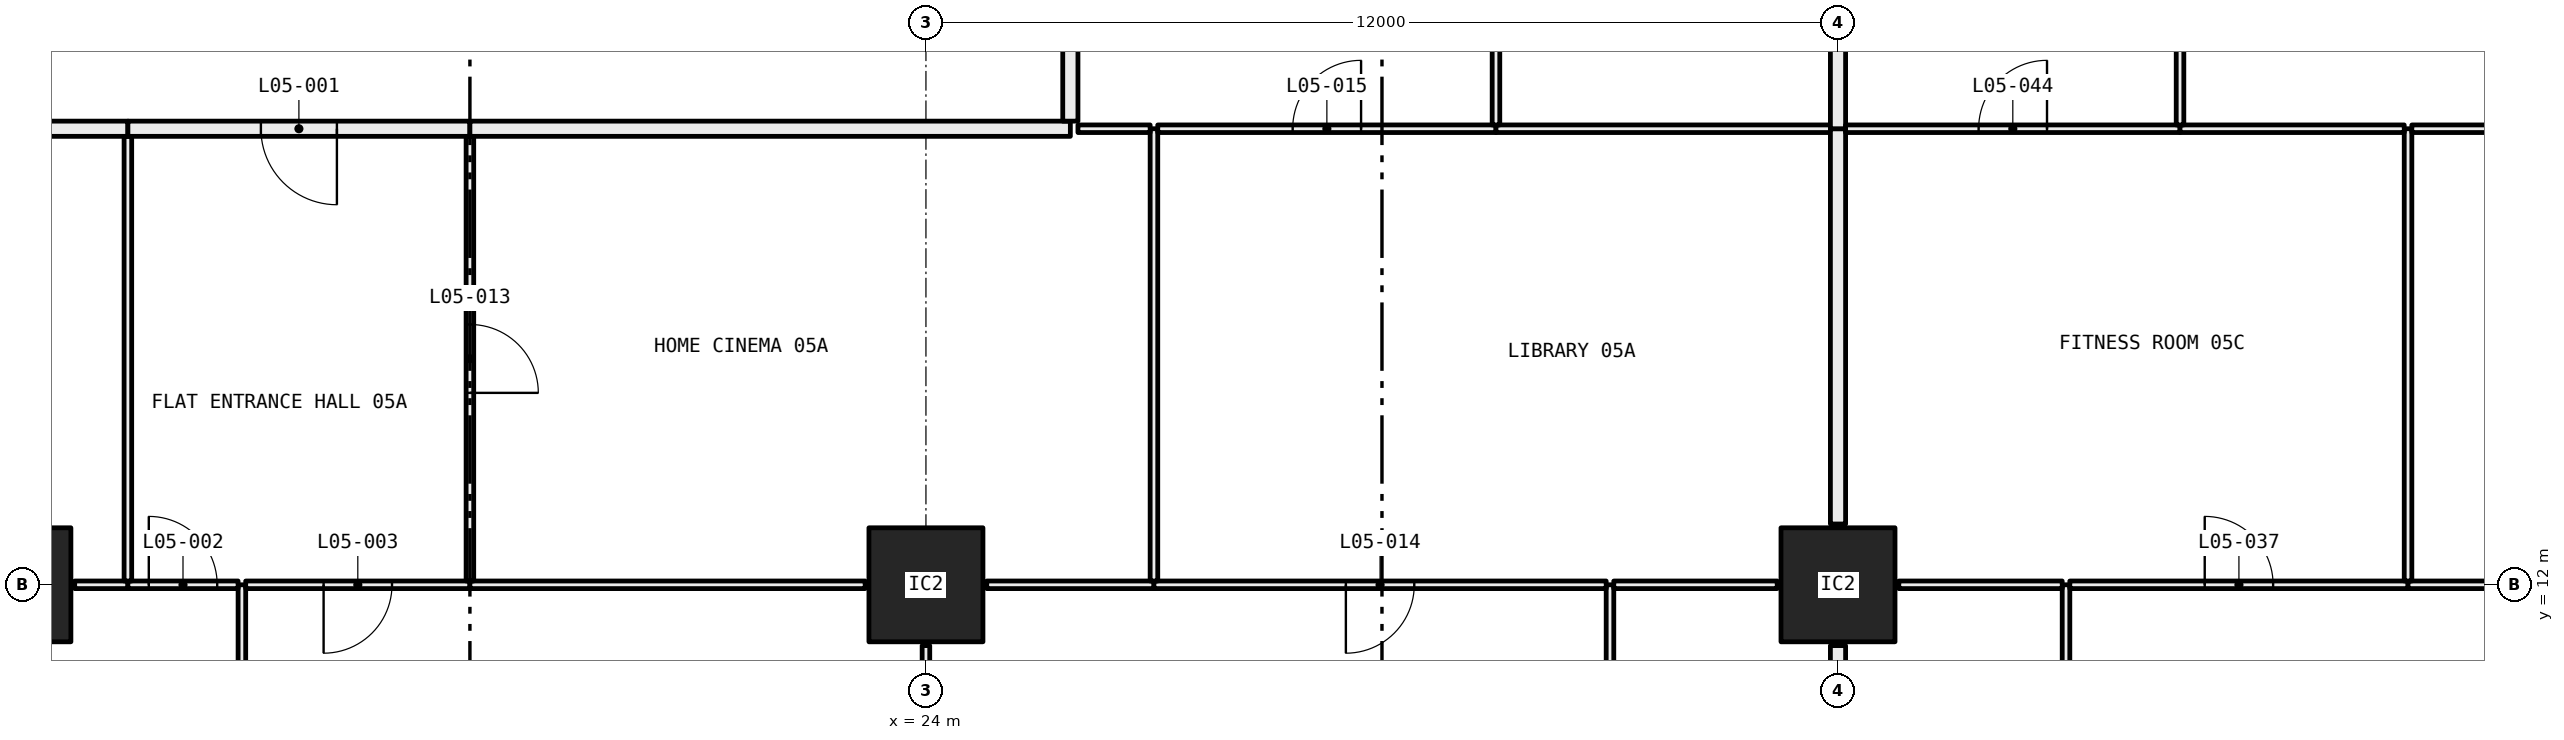
"""IFC4 building model, lengths in metres.
Left out: names, types, materials, properties, quantities, classifications, styles, units other than length and angle.
Written with IfcOpenShell. Run it as: python <this file> out.ifc"""

import sys

from ifc_helpers import new_model, si_unit, direction, frame, frame_2d, origin, origin_2d, place, context, subcontext, project, spatial, rectangle, hollow_rectangle, extrude, element, fill, save


model = new_model("IFC4")
c1 = context("Model", 3, precision=1e-05, world=origin(), true_north=direction((0.0, 1.0)))
c2 = subcontext(c1, "Body", "Model", "MODEL_VIEW")
j1 = project(units=[si_unit("LENGTHUNIT", "METRE"), si_unit("PLANEANGLEUNIT", "RADIAN")], contexts=[c1])
p1 = place(None, origin())
s1 = spatial("IfcSite", under=j1, at=p1, CompositionType="ELEMENT")
p2 = place(p1, origin())
s2 = spatial("IfcBuilding", under=s1, at=p2, CompositionType="ELEMENT")
p3 = place(p2, frame((0.0, 0.0, 30.0)))
s3 = spatial("IfcBuildingStorey", under=s2, at=p3, CompositionType="ELEMENT", Elevation=30.0)
for number, where, z_axis, x_axis in (
    (1, (12.0, 12.0, 0.0), (0.0, 0.0, 1.0), (1.0, 0.0, 0.0)),
    (2, (24.0, 12.0, 0.0), (0.0, 0.0, 1.0), (1.0, 0.0, 0.0)),
    (3, (36.0, 12.0, 0.0), (0.0, 0.0, 1.0), (1.0, 0.0, 0.0)),
):
    element("IfcColumn", number, at=place(p3, frame(where, z_axis=z_axis, x_axis=x_axis)), inside=s3, PredefinedType="COLUMN", context=c2, shape_type="SweptSolid", body=[
        extrude(hollow_rectangle(XDim=1.5, YDim=1.5, WallThickness=0.065, at=origin_2d()), origin(), (0.0, 0.0, 1.0), 3.05),
    ])
p4 = place(p3, frame((15.0, 6.05, 0.0), z_axis=(0.0, 0.0, 1.0), x_axis=(0.0, 1.0, 0.0)))
e4 = element("IfcWall", 4, at=p4, inside=s3, PredefinedType="PARTITIONING", context=c2, shape_type="SweptSolid", body=[
    extrude(rectangle(XDim=5.95, YDim=0.1, at=frame_2d((2.975, 0.0))), origin(), (0.0, 0.0, 1.0), 2.45),
])
p5 = place(p3, frame((13.5, 12.0, 0.0), z_axis=(0.0, 0.0, 1.0), x_axis=(-1.0, 0.0, 0.0)))
e5 = element("IfcWall", 5, at=p5, inside=s3, PredefinedType="PARTITIONING", context=c2, shape_type="SweptSolid", body=[
    extrude(rectangle(XDim=0.7, YDim=0.1, at=frame_2d((0.35, 0.0))), origin(), (0.0, 0.0, 1.0), 2.45),
])
p6 = place(p3, frame((14.95, 12.0, 0.0), z_axis=(0.0, 0.0, 1.0), x_axis=(-1.0, 0.0, 0.0)))
e6 = element("IfcWall", 6, at=p6, inside=s3, PredefinedType="PARTITIONING", context=c2, shape_type="SweptSolid", body=[
    extrude(rectangle(XDim=1.45, YDim=0.1, at=frame_2d((0.725, 0.0))), origin(), (0.0, 0.0, 1.0), 2.45),
])
p7 = place(p6, frame((0.275, 0.0, 0.0)))
e7 = element("IfcOpeningElement", 7, at=p7, cuts=e6, PredefinedType="OPENING", context=c2, shape_type="SweptSolid", body=[
    extrude(rectangle(XDim=0.9, YDim=2.1, at=frame_2d((0.45, 1.05))), frame((0.0, 0.06, 0.0), z_axis=(0.0, -1.0, 0.0), x_axis=(1.0, 0.0, 0.0)), (0.0, 0.0, 1.0), 0.12),
])
p8 = place(p3, frame((24.0, 6.05, 0.0), z_axis=(0.0, 0.0, 1.0), x_axis=(0.0, 1.0, 0.0)))
e8 = element("IfcWall", 8, at=p8, inside=s3, PredefinedType="PARTITIONING", context=c2, shape_type="SweptSolid", body=[
    extrude(rectangle(XDim=5.15, YDim=0.1, at=frame_2d((2.575, 0.0))), origin(), (0.0, 0.0, 1.0), 2.45),
])
p9 = place(p8, frame((2.125, 0.0, 0.0)))
e9 = element("IfcOpeningElement", 9, at=p9, cuts=e8, PredefinedType="OPENING", context=c2, shape_type="SweptSolid", body=[
    extrude(rectangle(XDim=0.9, YDim=2.1, at=frame_2d((0.45, 1.05))), frame((0.0, 0.06, 0.0), z_axis=(0.0, -1.0, 0.0), x_axis=(1.0, 0.0, 0.0)), (0.0, 0.0, 1.0), 0.12),
])
p10 = place(p3, frame((18.0, 12.0, 0.0), z_axis=(0.0, 0.0, 1.0), x_axis=(-1.0, 0.0, 0.0)))
e10 = element("IfcWall", 10, at=p10, inside=s3, PredefinedType="PARTITIONING", context=c2, shape_type="SweptSolid", body=[
    extrude(rectangle(XDim=2.95, YDim=0.1, at=frame_2d((1.475, 0.0))), origin(), (0.0, 0.0, 1.0), 2.45),
])
p11 = place(p10, frame((1.025, 0.0, 0.0)))
e11 = element("IfcOpeningElement", 11, at=p11, cuts=e10, PredefinedType="OPENING", context=c2, shape_type="SweptSolid", body=[
    extrude(rectangle(XDim=0.9, YDim=2.1, at=frame_2d((0.45, 1.05))), frame((0.0, 0.06, 0.0), z_axis=(0.0, -1.0, 0.0), x_axis=(1.0, 0.0, 0.0)), (0.0, 0.0, 1.0), 0.12),
])
p12 = place(p3, frame((23.2, 12.0, 0.0), z_axis=(0.0, 0.0, 1.0), x_axis=(-1.0, 0.0, 0.0)))
e12 = element("IfcWall", 12, at=p12, inside=s3, PredefinedType="PARTITIONING", context=c2, shape_type="SweptSolid", body=[
    extrude(rectangle(XDim=5.2, YDim=0.1, at=frame_2d((2.6, 0.0))), origin(), (0.0, 0.0, 1.0), 2.45),
])
p13 = place(p3, frame((33.0, 6.05, 0.0), z_axis=(0.0, 0.0, 1.0), x_axis=(0.0, 1.0, 0.0)))
e13 = element("IfcWall", 13, at=p13, inside=s3, PredefinedType="PARTITIONING", context=c2, shape_type="SweptSolid", body=[
    extrude(rectangle(XDim=5.95, YDim=0.1, at=frame_2d((2.975, 0.0))), origin(), (0.0, 0.0, 1.0), 2.45),
])
p14 = place(p13, frame((2.525, 0.0, 0.0)))
e14 = element("IfcOpeningElement", 14, at=p14, cuts=e13, PredefinedType="OPENING", context=c2, shape_type="SweptSolid", body=[
    extrude(rectangle(XDim=0.9, YDim=2.1, at=frame_2d((0.45, 1.05))), frame((0.0, 0.06, 0.0), z_axis=(0.0, -1.0, 0.0), x_axis=(1.0, 0.0, 0.0)), (0.0, 0.0, 1.0), 0.12),
])
p15 = place(p3, frame((27.0, 12.0, 0.0), z_axis=(0.0, 0.0, 1.0), x_axis=(-1.0, 0.0, 0.0)))
e15 = element("IfcWall", 15, at=p15, inside=s3, PredefinedType="PARTITIONING", context=c2, shape_type="SweptSolid", body=[
    extrude(rectangle(XDim=2.2, YDim=0.1, at=frame_2d((1.1, 0.0))), origin(), (0.0, 0.0, 1.0), 2.45),
])
p16 = place(p3, frame((32.95, 12.0, 0.0), z_axis=(0.0, 0.0, 1.0), x_axis=(-1.0, 0.0, 0.0)))
e16 = element("IfcWall", 16, at=p16, inside=s3, PredefinedType="PARTITIONING", context=c2, shape_type="SweptSolid", body=[
    extrude(rectangle(XDim=5.95, YDim=0.1, at=frame_2d((2.975, 0.0))), origin(), (0.0, 0.0, 1.0), 2.45),
])
p17 = place(p16, frame((2.525, 0.0, 0.0)))
e17 = element("IfcOpeningElement", 17, at=p17, cuts=e16, PredefinedType="OPENING", context=c2, shape_type="SweptSolid", body=[
    extrude(rectangle(XDim=0.9, YDim=2.1, at=frame_2d((0.45, 1.05))), frame((0.0, 0.06, 0.0), z_axis=(0.0, -1.0, 0.0), x_axis=(1.0, 0.0, 0.0)), (0.0, 0.0, 1.0), 0.12),
])
p18 = place(p3, frame((35.2, 12.0, 0.0), z_axis=(0.0, 0.0, 1.0), x_axis=(-1.0, 0.0, 0.0)))
e18 = element("IfcWall", 18, at=p18, inside=s3, PredefinedType="PARTITIONING", context=c2, shape_type="SweptSolid", body=[
    extrude(rectangle(XDim=2.15, YDim=0.1, at=frame_2d((1.075, 0.0))), origin(), (0.0, 0.0, 1.0), 2.45),
])
p19 = place(p3, frame((36.0, 6.0, 0.0), z_axis=(0.0, 0.0, 1.0), x_axis=(0.0, 1.0, 0.0)))
e19 = element("IfcWall", 19, at=p19, inside=s3, PredefinedType="PARTITIONING", context=c2, shape_type="SweptSolid", body=[
    extrude(rectangle(XDim=5.2, YDim=0.2, at=frame_2d((2.6, 0.0))), origin(), (0.0, 0.0, 1.0), 2.45),
])
p20 = place(p3, frame((13.5, 12.05, 0.0), z_axis=(0.0, 0.0, 1.0), x_axis=(0.0, 1.0, 0.0)))
e20 = element("IfcWall", 20, at=p20, inside=s3, PredefinedType="PARTITIONING", context=c2, shape_type="SweptSolid", body=[
    extrude(rectangle(XDim=5.85, YDim=0.1, at=frame_2d((2.925, 0.0))), origin(), (0.0, 0.0, 1.0), 2.45),
])
p21 = place(p3, frame((13.5, 18.0, 0.0), z_axis=(0.0, 0.0, 1.0), x_axis=(-1.0, 0.0, 0.0)))
e21 = element("IfcWall", 21, at=p21, inside=s3, PredefinedType="PARTITIONING", context=c2, shape_type="SweptSolid", body=[
    extrude(rectangle(XDim=3.4, YDim=0.2, at=frame_2d((1.7, 0.0))), origin(), (0.0, 0.0, 1.0), 3.05),
])
p22 = place(p3, frame((18.0, 12.05, 0.0), z_axis=(0.0, 0.0, 1.0), x_axis=(0.0, 1.0, 0.0)))
e22 = element("IfcWall", 22, at=p22, inside=s3, PredefinedType="PARTITIONING", context=c2, shape_type="SweptSolid", body=[
    extrude(rectangle(XDim=5.85, YDim=0.1, at=frame_2d((2.925, 0.0))), origin(), (0.0, 0.0, 1.0), 2.45),
])
p23 = place(p22, frame((2.475, 0.0, 0.0)))
e23 = element("IfcOpeningElement", 23, at=p23, cuts=e22, PredefinedType="OPENING", context=c2, shape_type="SweptSolid", body=[
    extrude(rectangle(XDim=0.9, YDim=2.1, at=frame_2d((0.45, 1.05))), frame((0.0, 0.06, 0.0), z_axis=(0.0, -1.0, 0.0), x_axis=(1.0, 0.0, 0.0)), (0.0, 0.0, 1.0), 0.12),
])
p24 = place(p3, frame((18.0, 18.0, 0.0), z_axis=(0.0, 0.0, 1.0), x_axis=(-1.0, 0.0, 0.0)))
e24 = element("IfcWall", 24, at=p24, inside=s3, PredefinedType="PARTITIONING", context=c2, shape_type="SweptSolid", body=[
    extrude(rectangle(XDim=4.5, YDim=0.2, at=frame_2d((2.25, 0.0))), origin(), (0.0, 0.0, 1.0), 3.05),
])
p25 = place(p24, frame((1.75, 0.0, 0.0)))
e25 = element("IfcOpeningElement", 25, at=p25, cuts=e24, PredefinedType="OPENING", context=c2, shape_type="SweptSolid", body=[
    extrude(rectangle(XDim=1.0, YDim=2.1, at=frame_2d((0.5, 1.05))), frame((0.0, 0.11, 0.0), z_axis=(0.0, -1.0, 0.0), x_axis=(1.0, 0.0, 0.0)), (0.0, 0.0, 1.0), 0.22),
])
p26 = place(p3, frame((27.0, 12.05, 0.0), z_axis=(0.0, 0.0, 1.0), x_axis=(0.0, 1.0, 0.0)))
e26 = element("IfcWall", 26, at=p26, inside=s3, PredefinedType="PARTITIONING", context=c2, shape_type="SweptSolid", body=[
    extrude(rectangle(XDim=5.95, YDim=0.1, at=frame_2d((2.975, 0.0))), origin(), (0.0, 0.0, 1.0), 2.45),
])
p27 = place(p3, frame((26.95, 18.0, 0.0), z_axis=(0.0, 0.0, 1.0), x_axis=(-1.0, 0.0, 0.0)))
e27 = element("IfcWall", 27, at=p27, inside=s3, PredefinedType="PARTITIONING", context=c2, shape_type="SweptSolid", body=[
    extrude(rectangle(XDim=0.95, YDim=0.1, at=frame_2d((0.475, 0.0))), origin(), (0.0, 0.0, 1.0), 3.05),
])
p28 = place(p3, frame((25.9, 18.0, 0.0), z_axis=(0.0, 0.0, 1.0), x_axis=(-1.0, 0.0, 0.0)))
e28 = element("IfcWall", 28, at=p28, inside=s3, PredefinedType="PARTITIONING", context=c2, shape_type="SweptSolid", body=[
    extrude(rectangle(XDim=7.9, YDim=0.2, at=frame_2d((3.95, 0.0))), origin(), (0.0, 0.0, 1.0), 3.05),
])
p29 = place(p3, frame((31.5, 18.0, 0.0), z_axis=(0.0, 0.0, 1.0), x_axis=(-1.0, 0.0, 0.0)))
e29 = element("IfcWall", 29, at=p29, inside=s3, PredefinedType="PARTITIONING", context=c2, shape_type="SweptSolid", body=[
    extrude(rectangle(XDim=4.45, YDim=0.1, at=frame_2d((2.225, 0.0))), origin(), (0.0, 0.0, 1.0), 3.05),
])
p30 = place(p29, frame((1.775, 0.0, 0.0)))
e30 = element("IfcOpeningElement", 30, at=p30, cuts=e29, PredefinedType="OPENING", context=c2, shape_type="SweptSolid", body=[
    extrude(rectangle(XDim=0.9, YDim=2.1, at=frame_2d((0.45, 1.05))), frame((0.0, 0.06, 0.0), z_axis=(0.0, -1.0, 0.0), x_axis=(1.0, 0.0, 0.0)), (0.0, 0.0, 1.0), 0.12),
])
p31 = place(p3, frame((35.9, 18.0, 0.0), z_axis=(0.0, 0.0, 1.0), x_axis=(-1.0, 0.0, 0.0)))
e31 = element("IfcWall", 31, at=p31, inside=s3, PredefinedType="PARTITIONING", context=c2, shape_type="SweptSolid", body=[
    extrude(rectangle(XDim=4.4, YDim=0.1, at=frame_2d((2.2, 0.0))), origin(), (0.0, 0.0, 1.0), 3.05),
])
p32 = place(p3, frame((36.0, 12.8, 0.0), z_axis=(0.0, 0.0, 1.0), x_axis=(0.0, 1.0, 0.0)))
e32 = element("IfcWall", 32, at=p32, inside=s3, PredefinedType="PARTITIONING", context=c2, shape_type="SweptSolid", body=[
    extrude(rectangle(XDim=5.2, YDim=0.2, at=frame_2d((2.6, 0.0))), origin(), (0.0, 0.0, 1.0), 2.45),
])
p33 = place(p3, frame((31.5, 18.05, 0.0), z_axis=(0.0, 0.0, 1.0), x_axis=(0.0, 1.0, 0.0)))
e33 = element("IfcWall", 33, at=p33, inside=s3, PredefinedType="PARTITIONING", context=c2, shape_type="SweptSolid", body=[
    extrude(rectangle(XDim=6.25, YDim=0.1, at=frame_2d((3.125, 0.0))), origin(), (0.0, 0.0, 1.0), 2.45),
])
p34 = place(p33, frame((2.675, 0.0, 0.0)))
e34 = element("IfcOpeningElement", 34, at=p34, cuts=e33, PredefinedType="OPENING", context=c2, shape_type="SweptSolid", body=[
    extrude(rectangle(XDim=0.9, YDim=2.1, at=frame_2d((0.45, 1.05))), frame((0.0, 0.06, 0.0), z_axis=(0.0, -1.0, 0.0), x_axis=(1.0, 0.0, 0.0)), (0.0, 0.0, 1.0), 0.12),
])
p35 = place(p3, frame((25.9, 23.9, 0.0), z_axis=(0.0, 0.0, 1.0), x_axis=(0.0, -1.0, 0.0)))
e35 = element("IfcWall", 35, at=p35, inside=s3, PredefinedType="PARTITIONING", context=c2, shape_type="SweptSolid", body=[
    extrude(rectangle(XDim=5.8, YDim=0.2, at=frame_2d((2.9, 0.0))), origin(), (0.0, 0.0, 1.0), 3.05),
])
p36 = place(p3, frame((36.0, 18.0, 0.0), z_axis=(0.0, 0.0, 1.0), x_axis=(0.0, 1.0, 0.0)))
e36 = element("IfcWall", 36, at=p36, inside=s3, PredefinedType="PARTITIONING", context=c2, shape_type="SweptSolid", body=[
    extrude(rectangle(XDim=5.2, YDim=0.2, at=frame_2d((2.6, 0.0))), origin(), (0.0, 0.0, 1.0), 2.45),
])
p37 = place(p3, frame((39.0, 6.05, 0.0), z_axis=(0.0, 0.0, 1.0), x_axis=(0.0, 1.0, 0.0)))
e37 = element("IfcWall", 37, at=p37, inside=s3, PredefinedType="PARTITIONING", context=c2, shape_type="SweptSolid", body=[
    extrude(rectangle(XDim=5.95, YDim=0.1, at=frame_2d((2.975, 0.0))), origin(), (0.0, 0.0, 1.0), 2.45),
])
p38 = place(p37, frame((2.525, 0.0, 0.0)))
e38 = element("IfcOpeningElement", 38, at=p38, cuts=e37, PredefinedType="OPENING", context=c2, shape_type="SweptSolid", body=[
    extrude(rectangle(XDim=0.9, YDim=2.1, at=frame_2d((0.45, 1.05))), frame((0.0, 0.06, 0.0), z_axis=(0.0, -1.0, 0.0), x_axis=(1.0, 0.0, 0.0)), (0.0, 0.0, 1.0), 0.12),
])
p39 = place(p3, frame((38.95, 12.0, 0.0), z_axis=(0.0, 0.0, 1.0), x_axis=(-1.0, 0.0, 0.0)))
e39 = element("IfcWall", 39, at=p39, inside=s3, PredefinedType="PARTITIONING", context=c2, shape_type="SweptSolid", body=[
    extrude(rectangle(XDim=2.15, YDim=0.1, at=frame_2d((1.075, 0.0))), origin(), (0.0, 0.0, 1.0), 2.45),
])
p40 = place(p3, frame((43.5, 12.0, 0.0), z_axis=(0.0, 0.0, 1.0), x_axis=(-1.0, 0.0, 0.0)))
e40 = element("IfcWall", 40, at=p40, inside=s3, PredefinedType="PARTITIONING", context=c2, shape_type="SweptSolid", body=[
    extrude(rectangle(XDim=4.45, YDim=0.1, at=frame_2d((2.225, 0.0))), origin(), (0.0, 0.0, 1.0), 2.45),
])
p41 = place(p40, frame((1.775, 0.0, 0.0)))
e41 = element("IfcOpeningElement", 41, at=p41, cuts=e40, PredefinedType="OPENING", context=c2, shape_type="SweptSolid", body=[
    extrude(rectangle(XDim=0.9, YDim=2.1, at=frame_2d((0.45, 1.05))), frame((0.0, 0.06, 0.0), z_axis=(0.0, -1.0, 0.0), x_axis=(1.0, 0.0, 0.0)), (0.0, 0.0, 1.0), 0.12),
])
p42 = place(p3, frame((47.02, 12.0, 0.0), z_axis=(0.0, 0.0, 1.0), x_axis=(-1.0, 0.0, 0.0)))
e42 = element("IfcWall", 42, at=p42, inside=s3, PredefinedType="PARTITIONING", context=c2, shape_type="SweptSolid", body=[
    extrude(rectangle(XDim=3.52, YDim=0.1, at=frame_2d((1.76, 0.0))), origin(), (0.0, 0.0, 1.0), 2.45),
])
p43 = place(p3, frame((43.5, 12.05, 0.0), z_axis=(0.0, 0.0, 1.0), x_axis=(0.0, 1.0, 0.0)))
e43 = element("IfcWall", 43, at=p43, inside=s3, PredefinedType="PARTITIONING", context=c2, shape_type="SweptSolid", body=[
    extrude(rectangle(XDim=5.95, YDim=0.1, at=frame_2d((2.975, 0.0))), origin(), (0.0, 0.0, 1.0), 2.45),
])
p44 = place(p3, frame((40.5, 18.0, 0.0), z_axis=(0.0, 0.0, 1.0), x_axis=(-1.0, 0.0, 0.0)))
e44 = element("IfcWall", 44, at=p44, inside=s3, PredefinedType="PARTITIONING", context=c2, shape_type="SweptSolid", body=[
    extrude(rectangle(XDim=4.4, YDim=0.1, at=frame_2d((2.2, 0.0))), origin(), (0.0, 0.0, 1.0), 3.05),
])
p45 = place(p44, frame((1.75, 0.0, 0.0)))
e45 = element("IfcOpeningElement", 45, at=p45, cuts=e44, PredefinedType="OPENING", context=c2, shape_type="SweptSolid", body=[
    extrude(rectangle(XDim=0.9, YDim=2.1, at=frame_2d((0.45, 1.05))), frame((0.0, 0.06, 0.0), z_axis=(0.0, -1.0, 0.0), x_axis=(1.0, 0.0, 0.0)), (0.0, 0.0, 1.0), 0.12),
])
p46 = place(p3, frame((43.45, 18.0, 0.0), z_axis=(0.0, 0.0, 1.0), x_axis=(-1.0, 0.0, 0.0)))
e46 = element("IfcWall", 46, at=p46, inside=s3, PredefinedType="PARTITIONING", context=c2, shape_type="SweptSolid", body=[
    extrude(rectangle(XDim=2.95, YDim=0.1, at=frame_2d((1.475, 0.0))), origin(), (0.0, 0.0, 1.0), 3.05),
])
p47 = place(p3, frame((46.0, 18.0, 0.0), z_axis=(0.0, 0.0, 1.0), x_axis=(-1.0, 0.0, 0.0)))
e47 = element("IfcWall", 47, at=p47, inside=s3, PredefinedType="PARTITIONING", context=c2, shape_type="SweptSolid", body=[
    extrude(rectangle(XDim=2.45, YDim=0.1, at=frame_2d((1.225, 0.0))), origin(), (0.0, 0.0, 1.0), 3.05),
])
p48 = place(p3, frame((40.5, 18.05, 0.0), z_axis=(0.0, 0.0, 1.0), x_axis=(0.0, 1.0, 0.0)))
e48 = element("IfcWall", 48, at=p48, inside=s3, PredefinedType="PARTITIONING", context=c2, shape_type="SweptSolid", body=[
    extrude(rectangle(XDim=6.175, YDim=0.1, at=frame_2d((3.087, 0.0))), origin(), (0.0, 0.0, 1.0), 2.45),
])
p49 = place(p48, frame((2.637, 0.0, 0.0)))
e49 = element("IfcOpeningElement", 49, at=p49, cuts=e48, PredefinedType="OPENING", context=c2, shape_type="SweptSolid", body=[
    extrude(rectangle(XDim=0.9, YDim=2.1, at=frame_2d((0.45, 1.05))), frame((0.0, 0.06, 0.0), z_axis=(0.0, -1.0, 0.0), x_axis=(1.0, 0.0, 0.0)), (0.0, 0.0, 1.0), 0.12),
])
p50 = place(p25, origin())
e50 = element("IfcDoor", 50, at=p50, inside=s3, OperationType="SINGLE_SWING_RIGHT", PredefinedType="DOOR", context=c2, shape_type="SweptSolid", body=[
    extrude(rectangle(XDim=1.0, YDim=2.1, at=frame_2d((0.5, 1.05))), frame((0.0, 0.025, 0.0), z_axis=(0.0, -1.0, 0.0), x_axis=(1.0, 0.0, 0.0)), (0.0, 0.0, 1.0), 0.05),
])
fill(e25, e50)
p51 = place(p7, frame((0.9, 0.0, 0.0), x_axis=(-1.0, 0.0, 0.0)))
e51 = element("IfcDoor", 51, at=p51, inside=s3, OperationType="SINGLE_SWING_RIGHT", PredefinedType="DOOR", context=c2, shape_type="SweptSolid", body=[
    extrude(rectangle(XDim=0.9, YDim=2.1, at=frame_2d((0.45, 1.05))), frame((0.0, 0.025, 0.0), z_axis=(0.0, -1.0, 0.0), x_axis=(1.0, 0.0, 0.0)), (0.0, 0.0, 1.0), 0.05),
])
fill(e7, e51)
p52 = place(p11, origin())
e52 = element("IfcDoor", 52, at=p52, inside=s3, OperationType="SINGLE_SWING_LEFT", PredefinedType="DOOR", context=c2, shape_type="SweptSolid", body=[
    extrude(rectangle(XDim=0.9, YDim=2.1, at=frame_2d((0.45, 1.05))), frame((0.0, 0.025, 0.0), z_axis=(0.0, -1.0, 0.0), x_axis=(1.0, 0.0, 0.0)), (0.0, 0.0, 1.0), 0.05),
])
fill(e11, e52)
p53 = place(p23, frame((0.9, 0.0, 0.0), x_axis=(-1.0, 0.0, 0.0)))
e53 = element("IfcDoor", 53, at=p53, inside=s3, OperationType="SINGLE_SWING_LEFT", PredefinedType="DOOR", context=c2, shape_type="SweptSolid", body=[
    extrude(rectangle(XDim=0.9, YDim=2.1, at=frame_2d((0.45, 1.05))), frame((0.0, 0.025, 0.0), z_axis=(0.0, -1.0, 0.0), x_axis=(1.0, 0.0, 0.0)), (0.0, 0.0, 1.0), 0.05),
])
fill(e23, e53)
p54 = place(p17, origin())
e54 = element("IfcDoor", 54, at=p54, inside=s3, OperationType="SINGLE_SWING_LEFT", PredefinedType="DOOR", context=c2, shape_type="SweptSolid", body=[
    extrude(rectangle(XDim=0.9, YDim=2.1, at=frame_2d((0.45, 1.05))), frame((0.0, 0.025, 0.0), z_axis=(0.0, -1.0, 0.0), x_axis=(1.0, 0.0, 0.0)), (0.0, 0.0, 1.0), 0.05),
])
fill(e17, e54)
p55 = place(p30, frame((0.9, 0.0, 0.0), x_axis=(-1.0, 0.0, 0.0)))
e55 = element("IfcDoor", 55, at=p55, inside=s3, OperationType="SINGLE_SWING_LEFT", PredefinedType="DOOR", context=c2, shape_type="SweptSolid", body=[
    extrude(rectangle(XDim=0.9, YDim=2.1, at=frame_2d((0.45, 1.05))), frame((0.0, 0.025, 0.0), z_axis=(0.0, -1.0, 0.0), x_axis=(1.0, 0.0, 0.0)), (0.0, 0.0, 1.0), 0.05),
])
fill(e30, e55)
p56 = place(p41, frame((0.9, 0.0, 0.0), x_axis=(-1.0, 0.0, 0.0)))
e56 = element("IfcDoor", 56, at=p56, inside=s3, OperationType="SINGLE_SWING_RIGHT", PredefinedType="DOOR", context=c2, shape_type="SweptSolid", body=[
    extrude(rectangle(XDim=0.9, YDim=2.1, at=frame_2d((0.45, 1.05))), frame((0.0, 0.025, 0.0), z_axis=(0.0, -1.0, 0.0), x_axis=(1.0, 0.0, 0.0)), (0.0, 0.0, 1.0), 0.05),
])
fill(e41, e56)
p57 = place(p45, frame((0.9, 0.0, 0.0), x_axis=(-1.0, 0.0, 0.0)))
e57 = element("IfcDoor", 57, at=p57, inside=s3, OperationType="SINGLE_SWING_LEFT", PredefinedType="DOOR", context=c2, shape_type="SweptSolid", body=[
    extrude(rectangle(XDim=0.9, YDim=2.1, at=frame_2d((0.45, 1.05))), frame((0.0, 0.025, 0.0), z_axis=(0.0, -1.0, 0.0), x_axis=(1.0, 0.0, 0.0)), (0.0, 0.0, 1.0), 0.05),
])
fill(e45, e57)
save(model, sys.argv[1])
